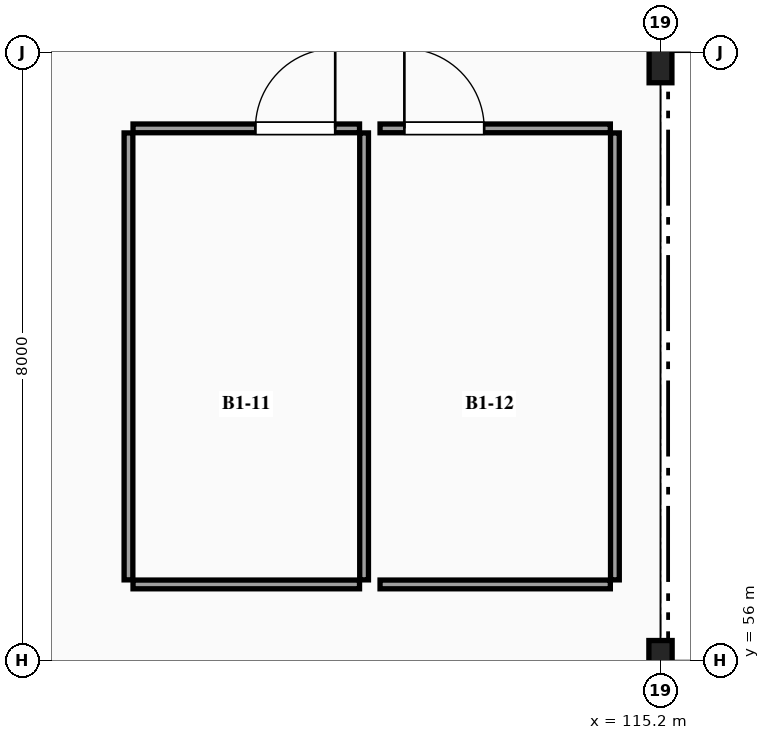
"""IFC4 building model, lengths in metres.
Left out: names, types, materials, properties, quantities, classifications, styles, units other than length and angle.
Written with IfcOpenShell. Run it as: python <this file> out.ifc"""

import sys

from ifc_helpers import new_model, si_unit, direction, frame, frame_2d, origin, origin_2d, place, context, subcontext, project, spatial, rectangle, i_section, extrude, element, fill, save


model = new_model("IFC4")
c1 = context("Model", 3, precision=1e-05, world=origin(), true_north=direction((0.0, 1.0)))
c2 = subcontext(c1, "Body", "Model", "MODEL_VIEW")
j1 = project(units=[si_unit("LENGTHUNIT", "METRE"), si_unit("PLANEANGLEUNIT", "RADIAN")], contexts=[c1])
p1 = place(None, origin())
s1 = spatial("IfcSite", under=j1, at=p1, CompositionType="ELEMENT")
p2 = place(p1, origin())
s2 = spatial("IfcBuilding", under=s1, at=p2, CompositionType="ELEMENT")
p3 = place(p2, frame((0.0, 0.0, -4.5)))
s3 = spatial("IfcBuildingStorey", under=s2, at=p3, CompositionType="ELEMENT", Elevation=-4.5)
p4 = place(p3, frame((115.2, 56.0, 0.0), z_axis=(0.0, 0.0, 1.0), x_axis=(1.0, 0.0, 0.0)))
e1 = element("IfcColumn", 1, at=p4, inside=s3, PredefinedType="COLUMN", context=c2, shape_type="SweptSolid", body=[
    extrude(i_section(OverallWidth=0.306, OverallDepth=0.524, WebThickness=0.021, FlangeThickness=0.04, FilletRadius=0.027, at=origin_2d()), origin(), (0.0, 0.0, 1.0), 4.22),
])
p5 = place(p3, frame((115.2, 64.0, 0.0), z_axis=(0.0, 0.0, 1.0), x_axis=(1.0, 0.0, 0.0)))
e2 = element("IfcColumn", 2, at=p5, inside=s3, PredefinedType="COLUMN", context=c2, shape_type="SweptSolid", body=[
    extrude(i_section(OverallWidth=0.3, OverallDepth=0.8, WebThickness=0.018, FlangeThickness=0.033, FilletRadius=0.03, at=origin_2d()), origin(), (0.0, 0.0, 1.0), 4.22),
])
p6 = place(p3, frame((108.26, 63.0, 0.0), z_axis=(0.0, 0.0, 1.0), x_axis=(1.0, 0.0, 0.0)))
e3 = element("IfcWall", 3, at=p6, inside=s3, PredefinedType="PARTITIONING", context=c2, shape_type="SweptSolid", body=[
    extrude(rectangle(XDim=2.98, YDim=0.115, at=frame_2d((1.49, 0.0))), origin(), (0.0, 0.0, 1.0), 3.58),
])
p7 = place(p6, frame((1.61, 0.0, 0.0)))
e4 = element("IfcOpeningElement", 4, at=p7, cuts=e3, PredefinedType="OPENING", context=c2, shape_type="SweptSolid", body=[
    extrude(rectangle(XDim=1.05, YDim=2.15, at=frame_2d((0.525, 1.075))), frame((0.0, 0.067, 0.0), z_axis=(0.0, -1.0, 0.0), x_axis=(1.0, 0.0, 0.0)), (0.0, 0.0, 1.0), 0.135),
])
p8 = place(p3, frame((108.26, 57.0, 0.0), z_axis=(0.0, 0.0, 1.0), x_axis=(1.0, 0.0, 0.0)))
e5 = element("IfcWall", 5, at=p8, inside=s3, PredefinedType="PARTITIONING", context=c2, shape_type="SweptSolid", body=[
    extrude(rectangle(XDim=2.98, YDim=0.115, at=frame_2d((1.49, 0.0))), origin(), (0.0, 0.0, 1.0), 3.58),
])
for number, where, z_axis, x_axis in (
    (6, (108.2, 57.06, 0.0), (0.0, 0.0, 1.0), (0.0, 1.0, 0.0)),
    (7, (111.3, 57.06, 0.0), (0.0, 0.0, 1.0), (0.0, 1.0, 0.0)),
):
    element("IfcWall", number, at=place(p3, frame(where, z_axis=z_axis, x_axis=x_axis)), inside=s3, PredefinedType="PARTITIONING", context=c2, shape_type="SweptSolid", body=[
        extrude(rectangle(XDim=5.88, YDim=0.115, at=frame_2d((2.94, 0.0))), origin(), (0.0, 0.0, 1.0), 3.58),
    ])
p9 = place(p3, frame((111.51, 63.0, 0.0), z_axis=(0.0, 0.0, 1.0), x_axis=(1.0, 0.0, 0.0)))
e8 = element("IfcWall", 8, at=p9, inside=s3, PredefinedType="PARTITIONING", context=c2, shape_type="SweptSolid", body=[
    extrude(rectangle(XDim=3.03, YDim=0.115, at=frame_2d((1.515, 0.0))), origin(), (0.0, 0.0, 1.0), 3.58),
])
p10 = place(p9, frame((0.32, 0.0, 0.0)))
e9 = element("IfcOpeningElement", 9, at=p10, cuts=e8, PredefinedType="OPENING", context=c2, shape_type="SweptSolid", body=[
    extrude(rectangle(XDim=1.05, YDim=2.15, at=frame_2d((0.525, 1.075))), frame((0.0, 0.067, 0.0), z_axis=(0.0, -1.0, 0.0), x_axis=(1.0, 0.0, 0.0)), (0.0, 0.0, 1.0), 0.135),
])
p11 = place(p3, frame((111.51, 57.0, 0.0), z_axis=(0.0, 0.0, 1.0), x_axis=(1.0, 0.0, 0.0)))
e10 = element("IfcWall", 10, at=p11, inside=s3, PredefinedType="PARTITIONING", context=c2, shape_type="SweptSolid", body=[
    extrude(rectangle(XDim=3.03, YDim=0.115, at=frame_2d((1.515, 0.0))), origin(), (0.0, 0.0, 1.0), 3.58),
])
p12 = place(p3, frame((114.6, 57.06, 0.0), z_axis=(0.0, 0.0, 1.0), x_axis=(0.0, 1.0, 0.0)))
e11 = element("IfcWall", 11, at=p12, inside=s3, PredefinedType="PARTITIONING", context=c2, shape_type="SweptSolid", body=[
    extrude(rectangle(XDim=5.88, YDim=0.115, at=frame_2d((2.94, 0.0))), origin(), (0.0, 0.0, 1.0), 3.58),
])
p13 = place(p7, origin())
e12 = element("IfcDoor", 12, at=p13, inside=s3, OperationType="SINGLE_SWING_RIGHT", PredefinedType="DOOR", context=c2, shape_type="SweptSolid", body=[
    extrude(rectangle(XDim=1.05, YDim=2.15, at=frame_2d((0.525, 1.075))), frame((0.0, 0.025, 0.0), z_axis=(0.0, -1.0, 0.0), x_axis=(1.0, 0.0, 0.0)), (0.0, 0.0, 1.0), 0.05),
])
fill(e4, e12)
p14 = place(p10, origin())
e13 = element("IfcDoor", 13, at=p14, inside=s3, OperationType="SINGLE_SWING_LEFT", PredefinedType="DOOR", context=c2, shape_type="SweptSolid", body=[
    extrude(rectangle(XDim=1.05, YDim=2.15, at=frame_2d((0.525, 1.075))), frame((0.0, 0.025, 0.0), z_axis=(0.0, -1.0, 0.0), x_axis=(1.0, 0.0, 0.0)), (0.0, 0.0, 1.0), 0.05),
])
fill(e9, e13)
save(model, sys.argv[1])
